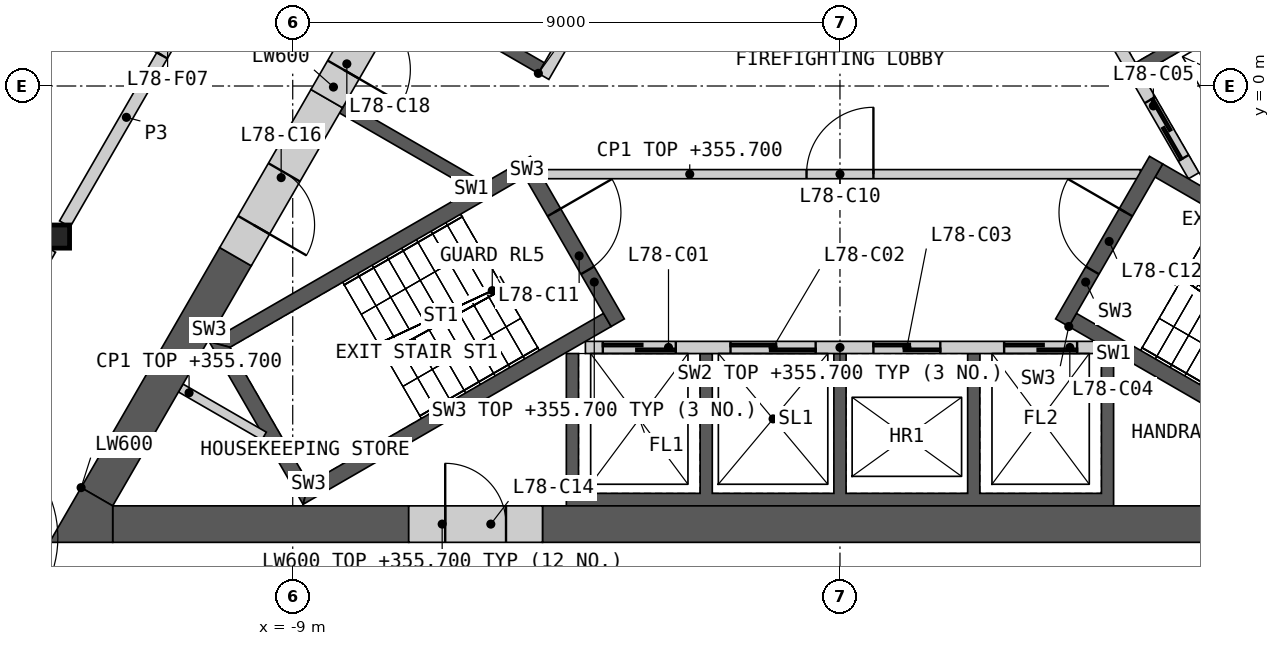
"""IFC4 building model, lengths in metres.
Left out: names, types, materials, properties, quantities, classifications, styles, units other than length and angle.
Written with IfcOpenShell. Run it as: python <this file> out.ifc"""

import sys

from ifc_helpers import new_model, si_unit, direction, frame, frame_2d, origin, origin_2d, place, context, subcontext, project, spatial, polyline, rectangle, i_section, outline, extrude, element, fill, save


model = new_model("IFC4")
c1 = context("Model", 3, precision=1e-05, world=origin(), true_north=direction((0.0, 1.0)))
c2 = subcontext(c1, "Body", "Model", "MODEL_VIEW")
j1 = project(units=[si_unit("LENGTHUNIT", "METRE"), si_unit("PLANEANGLEUNIT", "RADIAN")], contexts=[c1])
p1 = place(None, origin())
s1 = spatial("IfcSite", under=j1, at=p1, CompositionType="ELEMENT")
p2 = place(p1, origin())
s2 = spatial("IfcBuilding", under=s1, at=p2, CompositionType="ELEMENT")
p3 = place(p2, frame((0.0, 0.0, 346.0)))
s3 = spatial("IfcBuildingStorey", under=s2, at=p3, CompositionType="ELEMENT", Elevation=346.0)
p4 = place(p3, frame((-12.868, -2.476, 0.0), z_axis=(0.0, 0.0, 1.0), x_axis=(1.0, 0.0, 0.0)))
e1 = element("IfcColumn", 1, at=p4, inside=s3, PredefinedType="COLUMN", context=c2, shape_type="SweptSolid", body=[
    extrude(i_section(OverallWidth=0.396, OverallDepth=0.381, WebThickness=0.019, FlangeThickness=0.03, at=origin_2d()), origin(), (0.0, 0.0, 1.0), 10.0),
])
p5 = place(p3, origin())
e2 = element("IfcWall", 2, at=p5, inside=s3, PredefinedType="SHEAR", context=c2, shape_type="SweptSolid", body=[
    extrude(outline(polyline([(4.5, -4.4), (4.5, -6.906), (-4.5, -6.906), (-4.5, -4.4), (-4.3, -4.4), (-4.3, -6.7), (-2.3, -6.7), (-2.3, -4.4), (-2.1, -4.4), (-2.1, -6.7), (-0.1, -6.7), (-0.1, -4.4), (0.1, -4.4), (0.1, -6.7), (2.1, -6.7), (2.1, -4.4), (2.3, -4.4), (2.3, -6.7), (4.3, -6.7), (4.3, -4.4), (4.5, -4.4)])), origin(), (0.0, 0.0, 1.0), 9.7),
])
p6 = place(p3, frame((-4.187, -4.3, 0.0), z_axis=(0.0, 0.0, 1.0), x_axis=(1.0, 0.0, 0.0)))
e3 = element("IfcWall", 3, at=p6, inside=s3, PredefinedType="SOLIDWALL", context=c2, shape_type="SweptSolid", body=[
    extrude(rectangle(XDim=8.373, YDim=0.2, at=frame_2d((4.187, 0.0))), origin(), (0.0, 0.0, 1.0), 9.7),
])
p7 = place(p6, frame((0.287, 0.0, 0.0)))
e4 = element("IfcOpeningElement", 4, at=p7, cuts=e3, PredefinedType="OPENING", context=c2, shape_type="SweptSolid", body=[
    extrude(rectangle(XDim=1.2, YDim=2.1, at=frame_2d((0.6, 1.05))), frame((0.0, 0.11, 0.0), z_axis=(0.0, -1.0, 0.0), x_axis=(1.0, 0.0, 0.0)), (0.0, 0.0, 1.0), 0.22),
])
p8 = place(p6, frame((2.387, 0.0, 0.0)))
e5 = element("IfcOpeningElement", 5, at=p8, cuts=e3, PredefinedType="OPENING", context=c2, shape_type="SweptSolid", body=[
    extrude(rectangle(XDim=1.4, YDim=2.1, at=frame_2d((0.7, 1.05))), frame((0.0, 0.11, 0.0), z_axis=(0.0, -1.0, 0.0), x_axis=(1.0, 0.0, 0.0)), (0.0, 0.0, 1.0), 0.22),
])
p9 = place(p6, frame((4.737, 0.0, 0.0)))
e6 = element("IfcOpeningElement", 6, at=p9, cuts=e3, PredefinedType="OPENING", context=c2, shape_type="SweptSolid", body=[
    extrude(rectangle(XDim=1.1, YDim=2.1, at=frame_2d((0.55, 1.05))), frame((0.0, 0.11, 0.0), z_axis=(0.0, -1.0, 0.0), x_axis=(1.0, 0.0, 0.0)), (0.0, 0.0, 1.0), 0.22),
])
p10 = place(p6, frame((6.887, 0.0, 0.0)))
e7 = element("IfcOpeningElement", 7, at=p10, cuts=e3, PredefinedType="OPENING", context=c2, shape_type="SweptSolid", body=[
    extrude(rectangle(XDim=1.2, YDim=2.1, at=frame_2d((0.6, 1.05))), frame((0.0, 0.11, 0.0), z_axis=(0.0, -1.0, 0.0), x_axis=(1.0, 0.0, 0.0)), (0.0, 0.0, 1.0), 0.22),
])
p11 = place(p3, origin())
e8 = element("IfcWall", 8, at=p11, inside=s3, PredefinedType="SHEAR", context=c2, shape_type="SweptSolid", body=[
    extrude(outline(polyline([(1.561, 6.097), (3.731, 7.35), (8.231, -0.444), (6.061, -1.697), (5.96, -1.524), (7.952, -0.374), (6.952, 1.358), (4.96, 0.208), (4.861, 0.381), (6.852, 1.531), (5.852, 3.263), (3.861, 2.113), (3.76, 2.287), (5.752, 3.437), (4.752, 5.169), (2.76, 4.019), (2.66, 4.192), (4.652, 5.342), (3.652, 7.074), (1.66, 5.924), (1.561, 6.097)])), origin(), (0.0, 0.0, 1.0), 9.7),
])
p12 = place(p3, frame((5.817, -1.476, 0.0), z_axis=(0.0, 0.0, 1.0), x_axis=(-0.500002616675, 0.866023893041, 0.0)))
e9 = element("IfcWall", 9, at=p12, inside=s3, PredefinedType="SOLIDWALL", context=c2, shape_type="SweptSolid", body=[
    extrude(rectangle(XDim=8.373, YDim=0.2, at=frame_2d((4.187, 0.0))), origin(), (0.0, 0.0, 1.0), 9.7),
])
p13 = place(p12, frame((0.337, 0.0, 0.0)))
e10 = element("IfcOpeningElement", 10, at=p13, cuts=e9, PredefinedType="OPENING", context=c2, shape_type="SweptSolid", body=[
    extrude(rectangle(XDim=1.1, YDim=2.1, at=frame_2d((0.55, 1.05))), frame((0.0, 0.11, 0.0), z_axis=(0.0, -1.0, 0.0), x_axis=(1.0, 0.0, 0.0)), (0.0, 0.0, 1.0), 0.22),
])
p14 = place(p12, frame((2.537, 0.0, 0.0)))
e11 = element("IfcOpeningElement", 11, at=p14, cuts=e9, PredefinedType="OPENING", context=c2, shape_type="SweptSolid", body=[
    extrude(rectangle(XDim=1.1, YDim=2.1, at=frame_2d((0.55, 1.05))), frame((0.0, 0.11, 0.0), z_axis=(0.0, -1.0, 0.0), x_axis=(1.0, 0.0, 0.0)), (0.0, 0.0, 1.0), 0.22),
])
p15 = place(p12, frame((4.737, 0.0, 0.0)))
e12 = element("IfcOpeningElement", 12, at=p15, cuts=e9, PredefinedType="OPENING", context=c2, shape_type="SweptSolid", body=[
    extrude(rectangle(XDim=1.1, YDim=2.1, at=frame_2d((0.55, 1.05))), frame((0.0, 0.11, 0.0), z_axis=(0.0, -1.0, 0.0), x_axis=(1.0, 0.0, 0.0)), (0.0, 0.0, 1.0), 0.22),
])
p16 = place(p12, frame((7.037, 0.0, 0.0)))
e13 = element("IfcOpeningElement", 13, at=p16, cuts=e9, PredefinedType="OPENING", context=c2, shape_type="SweptSolid", body=[
    extrude(rectangle(XDim=0.9, YDim=2.1, at=frame_2d((0.45, 1.05))), frame((0.0, 0.11, 0.0), z_axis=(0.0, -1.0, 0.0), x_axis=(1.0, 0.0, 0.0)), (0.0, 0.0, 1.0), 0.22),
])
p17 = place(p3, origin())
e14 = element("IfcWall", 14, at=p17, inside=s3, PredefinedType="SHEAR", context=c2, shape_type="SweptSolid", body=[
    extrude(outline(polyline([(-6.061, -1.697), (-8.231, -0.444), (-8.131, -0.271), (-5.96, -1.524), (-6.061, -1.697)])), origin(), (0.0, 0.0, 1.0), 9.7),
])
p18 = place(p3, origin())
e15 = element("IfcWall", 15, at=p18, inside=s3, PredefinedType="SHEAR", context=c2, shape_type="SweptSolid", body=[
    extrude(outline(polyline([(-4.96, 0.208), (-7.131, 1.461), (-3.731, 7.35), (-1.561, 6.097), (-1.66, 5.924), (-3.652, 7.074), (-6.852, 1.531), (-4.861, 0.381), (-4.96, 0.208)])), origin(), (0.0, 0.0, 1.0), 9.7),
])
p19 = place(p3, frame((-1.631, 5.776, 0.0), z_axis=(0.0, 0.0, 1.0), x_axis=(-0.499992876559, -0.866029516466, 0.0)))
e16 = element("IfcWall", 16, at=p19, inside=s3, PredefinedType="SOLIDWALL", context=c2, shape_type="SweptSolid", body=[
    extrude(rectangle(XDim=6.486, YDim=0.2, at=frame_2d((3.243, 0.0))), origin(), (0.0, 0.0, 1.0), 9.7),
])
p20 = place(p19, frame((2.637, 0.0, 0.0)))
e17 = element("IfcOpeningElement", 17, at=p20, cuts=e16, PredefinedType="OPENING", context=c2, shape_type="SweptSolid", body=[
    extrude(rectangle(XDim=0.9, YDim=2.1, at=frame_2d((0.45, 1.05))), frame((0.0, 0.11, 0.0), z_axis=(0.0, -1.0, 0.0), x_axis=(1.0, 0.0, 0.0)), (0.0, 0.0, 1.0), 0.22),
])
p21 = place(p3, frame((-4.941, -1.45, 0.0), z_axis=(0.0, 0.0, 1.0), x_axis=(1.0, 0.0, 0.0)))
e18 = element("IfcWall", 18, at=p21, inside=s3, PredefinedType="PARTITIONING", context=c2, shape_type="SweptSolid", body=[
    extrude(rectangle(XDim=9.882, YDim=0.15, at=frame_2d((4.941, 0.0))), origin(), (0.0, 0.0, 1.0), 9.7),
])
p22 = place(p21, frame((4.391, 0.0, 0.0)))
e19 = element("IfcOpeningElement", 19, at=p22, cuts=e18, PredefinedType="OPENING", context=c2, shape_type="SweptSolid", body=[
    extrude(rectangle(XDim=1.1, YDim=2.1, at=frame_2d((0.55, 1.05))), frame((0.0, 0.085, 0.0), z_axis=(0.0, -1.0, 0.0), x_axis=(1.0, 0.0, 0.0)), (0.0, 0.0, 1.0), 0.17),
])
p23 = place(p3, origin())
e20 = element("IfcWall", 20, at=p23, inside=s3, PredefinedType="SHEAR", context=c2, shape_type="SweptSolid", body=[
    extrude(outline(polyline([(-5.307, -1.281), (-10.374, -4.206), (-10.032, -4.298), (-5.182, -1.498), (-5.307, -1.281)])), origin(), (0.0, 0.0, 1.0), 9.7),
])
p24 = place(p3, origin())
e21 = element("IfcWall", 21, at=p24, inside=s3, PredefinedType="SHEAR", context=c2, shape_type="SweptSolid", body=[
    extrude(outline(polyline([(-10.374, -4.206), (-8.83, -6.881), (-8.738, -6.539), (-10.032, -4.298), (-10.374, -4.206)])), origin(), (0.0, 0.0, 1.0), 9.7),
])
p25 = place(p3, origin())
e22 = element("IfcWall", 22, at=p25, inside=s3, PredefinedType="SHEAR", context=c2, shape_type="SweptSolid", body=[
    extrude(outline(polyline([(-8.738, -6.539), (-8.83, -6.881), (-3.763, -3.956), (-3.888, -3.739), (-8.738, -6.539)])), origin(), (0.0, 0.0, 1.0), 9.7),
])
p26 = place(p3, frame((-5.199, -1.219, 0.0), z_axis=(0.0, 0.0, 1.0), x_axis=(0.499982516597, -0.866035497597, 0.0)))
e23 = element("IfcWall", 23, at=p26, inside=s3, PredefinedType="SHEAR", context=c2, shape_type="SweptSolid", body=[
    extrude(rectangle(XDim=3.088, YDim=0.25, at=frame_2d((1.544, 0.0))), origin(), (0.0, 0.0, 1.0), 9.7),
])
p27 = place(p26, frame((0.994, 0.0, 0.0)))
e24 = element("IfcOpeningElement", 24, at=p27, cuts=e23, PredefinedType="OPENING", context=c2, shape_type="SweptSolid", body=[
    extrude(rectangle(XDim=1.1, YDim=2.1, at=frame_2d((0.55, 1.05))), frame((0.0, 0.135, 0.0), z_axis=(0.0, -1.0, 0.0), x_axis=(1.0, 0.0, 0.0)), (0.0, 0.0, 1.0), 0.27),
])
p28 = place(p3, origin())
e25 = element("IfcWall", 25, at=p28, inside=s3, PredefinedType="SHEAR", context=c2, shape_type="SweptSolid", body=[
    extrude(outline(polyline([(3.763, -3.956), (8.83, -6.881), (8.738, -6.539), (3.888, -3.739), (3.763, -3.956)])), origin(), (0.0, 0.0, 1.0), 9.7),
])
p29 = place(p3, origin())
e26 = element("IfcWall", 26, at=p29, inside=s3, PredefinedType="SHEAR", context=c2, shape_type="SweptSolid", body=[
    extrude(outline(polyline([(10.032, -4.298), (10.374, -4.206), (5.307, -1.281), (5.182, -1.498), (10.032, -4.298)])), origin(), (0.0, 0.0, 1.0), 9.7),
])
p30 = place(p3, frame((3.655, -3.893, 0.0), z_axis=(0.0, 0.0, 1.0), x_axis=(0.499982516597, 0.866035497597, 0.0)))
e27 = element("IfcWall", 27, at=p30, inside=s3, PredefinedType="SHEAR", context=c2, shape_type="SweptSolid", body=[
    extrude(rectangle(XDim=3.088, YDim=0.25, at=frame_2d((1.544, 0.0))), origin(), (0.0, 0.0, 1.0), 9.7),
])
p31 = place(p30, frame((0.994, 0.0, 0.0)))
e28 = element("IfcOpeningElement", 28, at=p31, cuts=e27, PredefinedType="OPENING", context=c2, shape_type="SweptSolid", body=[
    extrude(rectangle(XDim=1.1, YDim=2.1, at=frame_2d((0.55, 1.05))), frame((0.0, 0.135, 0.0), z_axis=(0.0, -1.0, 0.0), x_axis=(1.0, 0.0, 0.0)), (0.0, 0.0, 1.0), 0.27),
])
p32 = place(p3, frame((-10.842, -4.967, 0.0), z_axis=(0.0, 0.0, 1.0), x_axis=(0.866098216386, -0.499873863663, 0.0)))
e29 = element("IfcWall", 29, at=p32, inside=s3, PredefinedType="PARTITIONING", context=c2, shape_type="SweptSolid", body=[
    extrude(rectangle(XDim=1.582, YDim=0.15, at=frame_2d((0.791, 0.0))), origin(), (0.0, 0.0, 1.0), 9.7),
])
p33 = place(p3, frame((-4.892, -7.206, 0.0), z_axis=(0.0, 0.0, 1.0), x_axis=(1.0, 0.0, 0.0)))
e30 = element("IfcWall", 30, at=p33, inside=s3, PredefinedType="SHEAR", context=c2, shape_type="SweptSolid", body=[
    extrude(rectangle(XDim=16.853, YDim=0.6, at=frame_2d((8.426, 0.0))), origin(), (0.0, 0.0, 1.0), 9.7),
])
p34 = place(p3, frame((-11.961, -7.206, 0.0), z_axis=(0.0, 0.0, 1.0), x_axis=(1.0, 0.0, 0.0)))
e31 = element("IfcWall", 31, at=p34, inside=s3, PredefinedType="SHEAR", context=c2, shape_type="SweptSolid", body=[
    extrude(rectangle(XDim=4.868, YDim=0.6, at=frame_2d((2.434, 0.0))), origin(), (0.0, 0.0, 1.0), 9.7),
])
p35 = place(p3, frame((8.686, -0.634, 0.0), z_axis=(0.0, 0.0, 1.0), x_axis=(-0.500004601921, 0.866022746848, 0.0)))
e32 = element("IfcWall", 32, at=p35, inside=s3, PredefinedType="SHEAR", context=c2, shape_type="SweptSolid", body=[
    extrude(rectangle(XDim=16.853, YDim=0.6, at=frame_2d((8.426, 0.0))), origin(), (0.0, 0.0, 1.0), 9.7),
])
p36 = place(p3, frame((-9.941, -2.807, 0.0), z_axis=(0.0, 0.0, 1.0), x_axis=(-0.500020646047, -0.866013483456, 0.0)))
e33 = element("IfcWall", 33, at=p36, inside=s3, PredefinedType="SHEAR", context=c2, shape_type="SweptSolid", body=[
    extrude(rectangle(XDim=4.559, YDim=0.6, at=frame_2d((2.28, 0.0))), origin(), (0.0, 0.0, 1.0), 9.7),
])
p37 = place(p3, origin())
e34 = element("IfcWall", 34, at=p37, inside=s3, PredefinedType="SHEAR", context=c2, shape_type="SweptSolid", body=[
    extrude(outline(polyline([(-12.48, -6.606), (-11.961, -6.906), (-11.961, -7.506), (-13.0, -7.506), (-12.48, -6.606)])), origin(), (0.0, 0.0, 1.0), 9.7),
])
p38 = place(p3, frame((-7.092, -7.206, 0.0), z_axis=(0.0, 0.0, 1.0), x_axis=(1.0, 0.0, 0.0)))
e35 = element("IfcWall", 35, at=p38, inside=s3, PredefinedType="SHEAR", context=c2, shape_type="SweptSolid", body=[
    extrude(rectangle(XDim=2.2, YDim=0.6, at=frame_2d((1.1, 0.0))), origin(), (0.0, 0.0, 1.0), 9.7),
])
p39 = place(p38, frame((0.6, 0.0, 0.0)))
e36 = element("IfcOpeningElement", 36, at=p39, cuts=e35, PredefinedType="OPENING", context=c2, shape_type="SweptSolid", body=[
    extrude(rectangle(XDim=1.0, YDim=2.1, at=frame_2d((0.5, 1.05))), frame((0.0, 0.31, 0.0), z_axis=(0.0, -1.0, 0.0), x_axis=(1.0, 0.0, 0.0)), (0.0, 0.0, 1.0), 0.62),
])
p40 = place(p3, frame((-8.44, -0.208, 0.0), z_axis=(0.0, 0.0, 1.0), x_axis=(-0.499997052475, -0.866027105532, 0.0)))
e37 = element("IfcWall", 37, at=p40, inside=s3, PredefinedType="SHEAR", context=c2, shape_type="SweptSolid", body=[
    extrude(rectangle(XDim=3.001, YDim=0.6, at=frame_2d((1.501, 0.0))), origin(), (0.0, 0.0, 1.0), 9.7),
])
p41 = place(p40, frame((1.4, 0.0, 0.0)))
e38 = element("IfcOpeningElement", 38, at=p41, cuts=e37, PredefinedType="OPENING", context=c2, shape_type="SweptSolid", body=[
    extrude(rectangle(XDim=1.0, YDim=2.1, at=frame_2d((0.5, 1.05))), frame((0.0, 0.31, 0.0), z_axis=(0.0, -1.0, 0.0), x_axis=(1.0, 0.0, 0.0)), (0.0, 0.0, 1.0), 0.62),
])
p42 = place(p3, frame((-7.34, 1.698, 0.0), z_axis=(0.0, 0.0, 1.0), x_axis=(-0.50002983664, -0.866008176907, 0.0)))
e39 = element("IfcWall", 39, at=p42, inside=s3, PredefinedType="SHEAR", context=c2, shape_type="SweptSolid", body=[
    extrude(rectangle(XDim=2.2, YDim=0.6, at=frame_2d((1.1, 0.0))), origin(), (0.0, 0.0, 1.0), 9.7),
])
p43 = place(p42, frame((0.55, 0.0, 0.0)))
e40 = element("IfcOpeningElement", 40, at=p43, cuts=e39, PredefinedType="OPENING", context=c2, shape_type="SweptSolid", body=[
    extrude(rectangle(XDim=1.1, YDim=2.1, at=frame_2d((0.55, 1.05))), frame((0.0, 0.31, 0.0), z_axis=(0.0, -1.0, 0.0), x_axis=(1.0, 0.0, 0.0)), (0.0, 0.0, 1.0), 0.62),
])
p44 = place(p3, frame((-12.748, -2.269, 0.0), z_axis=(0.0, 0.0, 1.0), x_axis=(0.499984266882, 0.866034487114, 0.0)))
e41 = element("IfcWall", 41, at=p44, inside=s3, PredefinedType="PARTITIONING", context=c2, shape_type="SweptSolid", body=[
    extrude(rectangle(XDim=8.099, YDim=0.2, at=frame_2d((4.049, 0.0))), origin(), (0.0, 0.0, 1.0), 9.7),
])
p45 = place(p44, frame((3.2, 0.0, 0.0)))
e42 = element("IfcOpeningElement", 42, at=p45, cuts=e41, PredefinedType="OPENING", context=c2, shape_type="SweptSolid", body=[
    extrude(rectangle(XDim=1.8, YDim=2.1, at=frame_2d((0.9, 1.05))), frame((0.0, 0.11, 0.0), z_axis=(0.0, -1.0, 0.0), x_axis=(1.0, 0.0, 0.0)), (0.0, 0.0, 1.0), 0.22),
])
p46 = place(p3, frame((-15.244, -6.592, 0.0), z_axis=(0.0, 0.0, 1.0), x_axis=(0.49999094734, 0.866030630277, 0.0)))
e43 = element("IfcWall", 43, at=p46, inside=s3, PredefinedType="PARTITIONING", context=c2, shape_type="SweptSolid", body=[
    extrude(rectangle(XDim=4.513, YDim=0.2, at=frame_2d((2.256, 0.0))), origin(), (0.0, 0.0, 1.0), 9.7),
])
p47 = place(p46, frame((1.053, 0.0, 0.0)))
e44 = element("IfcOpeningElement", 44, at=p47, cuts=e43, PredefinedType="OPENING", context=c2, shape_type="SweptSolid", body=[
    extrude(rectangle(XDim=1.0, YDim=2.1, at=frame_2d((0.5, 1.05))), frame((0.0, 0.11, 0.0), z_axis=(0.0, -1.0, 0.0), x_axis=(1.0, 0.0, 0.0)), (0.0, 0.0, 1.0), 0.22),
])
p48 = place(p7, origin())
e45 = element("IfcDoor", 45, at=p48, inside=s3, OperationType="SLIDING_TO_LEFT", PredefinedType="DOOR", context=c2, shape_type="SweptSolid", body=[
    extrude(rectangle(XDim=1.2, YDim=2.1, at=frame_2d((0.6, 1.05))), frame((0.0, 0.025, 0.0), z_axis=(0.0, -1.0, 0.0), x_axis=(1.0, 0.0, 0.0)), (0.0, 0.0, 1.0), 0.05),
])
fill(e4, e45)
p49 = place(p8, origin())
e46 = element("IfcDoor", 46, at=p49, inside=s3, OperationType="SLIDING_TO_LEFT", PredefinedType="DOOR", context=c2, shape_type="SweptSolid", body=[
    extrude(rectangle(XDim=1.4, YDim=2.1, at=frame_2d((0.7, 1.05))), frame((0.0, 0.025, 0.0), z_axis=(0.0, -1.0, 0.0), x_axis=(1.0, 0.0, 0.0)), (0.0, 0.0, 1.0), 0.05),
])
fill(e5, e46)
p50 = place(p9, origin())
e47 = element("IfcDoor", 47, at=p50, inside=s3, OperationType="SLIDING_TO_LEFT", PredefinedType="DOOR", context=c2, shape_type="SweptSolid", body=[
    extrude(rectangle(XDim=1.1, YDim=2.1, at=frame_2d((0.55, 1.05))), frame((0.0, 0.025, 0.0), z_axis=(0.0, -1.0, 0.0), x_axis=(1.0, 0.0, 0.0)), (0.0, 0.0, 1.0), 0.05),
])
fill(e6, e47)
p51 = place(p10, origin())
e48 = element("IfcDoor", 48, at=p51, inside=s3, OperationType="SLIDING_TO_LEFT", PredefinedType="DOOR", context=c2, shape_type="SweptSolid", body=[
    extrude(rectangle(XDim=1.2, YDim=2.1, at=frame_2d((0.6, 1.05))), frame((0.0, 0.025, 0.0), z_axis=(0.0, -1.0, 0.0), x_axis=(1.0, 0.0, 0.0)), (0.0, 0.0, 1.0), 0.05),
])
fill(e7, e48)
p52 = place(p13, origin())
e49 = element("IfcDoor", 49, at=p52, inside=s3, OperationType="SLIDING_TO_LEFT", PredefinedType="DOOR", context=c2, shape_type="SweptSolid", body=[
    extrude(rectangle(XDim=1.1, YDim=2.1, at=frame_2d((0.55, 1.05))), frame((0.0, 0.025, 0.0), z_axis=(0.0, -1.0, 0.0), x_axis=(1.0, 0.0, 0.0)), (0.0, 0.0, 1.0), 0.05),
])
fill(e10, e49)
p53 = place(p22, origin())
e50 = element("IfcDoor", 50, at=p53, inside=s3, OperationType="SINGLE_SWING_RIGHT", PredefinedType="DOOR", context=c2, shape_type="SweptSolid", body=[
    extrude(rectangle(XDim=1.1, YDim=2.1, at=frame_2d((0.55, 1.05))), frame((0.0, 0.025, 0.0), z_axis=(0.0, -1.0, 0.0), x_axis=(1.0, 0.0, 0.0)), (0.0, 0.0, 1.0), 0.05),
])
fill(e19, e50)
p54 = place(p27, origin())
e51 = element("IfcDoor", 51, at=p54, inside=s3, OperationType="SINGLE_SWING_LEFT", PredefinedType="DOOR", context=c2, shape_type="SweptSolid", body=[
    extrude(rectangle(XDim=1.1, YDim=2.1, at=frame_2d((0.55, 1.05))), frame((0.0, 0.025, 0.0), z_axis=(0.0, -1.0, 0.0), x_axis=(1.0, 0.0, 0.0)), (0.0, 0.0, 1.0), 0.05),
])
fill(e24, e51)
p55 = place(p31, origin())
e52 = element("IfcDoor", 52, at=p55, inside=s3, OperationType="SINGLE_SWING_RIGHT", PredefinedType="DOOR", context=c2, shape_type="SweptSolid", body=[
    extrude(rectangle(XDim=1.1, YDim=2.1, at=frame_2d((0.55, 1.05))), frame((0.0, 0.025, 0.0), z_axis=(0.0, -1.0, 0.0), x_axis=(1.0, 0.0, 0.0)), (0.0, 0.0, 1.0), 0.05),
])
fill(e28, e52)
p56 = place(p39, origin())
e53 = element("IfcDoor", 53, at=p56, inside=s3, OperationType="SINGLE_SWING_LEFT", PredefinedType="DOOR", context=c2, shape_type="SweptSolid", body=[
    extrude(rectangle(XDim=1.0, YDim=2.1, at=frame_2d((0.5, 1.05))), frame((0.0, 0.055, 0.0), z_axis=(0.0, -1.0, 0.0), x_axis=(1.0, 0.0, 0.0)), (0.0, 0.0, 1.0), 0.05),
])
fill(e36, e53)
p57 = place(p41, origin())
e54 = element("IfcDoor", 54, at=p57, inside=s3, OperationType="SINGLE_SWING_RIGHT", PredefinedType="DOOR", context=c2, shape_type="SweptSolid", body=[
    extrude(rectangle(XDim=1.0, YDim=2.1, at=frame_2d((0.5, 1.05))), frame((0.0, 0.055, 0.0), z_axis=(0.0, -1.0, 0.0), x_axis=(1.0, 0.0, 0.0)), (0.0, 0.0, 1.0), 0.05),
])
fill(e38, e54)
p58 = place(p43, origin())
e55 = element("IfcDoor", 55, at=p58, inside=s3, OperationType="SINGLE_SWING_RIGHT", PredefinedType="DOOR", context=c2, shape_type="SweptSolid", body=[
    extrude(rectangle(XDim=1.1, YDim=2.1, at=frame_2d((0.55, 1.05))), frame((0.0, 0.055, 0.0), z_axis=(0.0, -1.0, 0.0), x_axis=(1.0, 0.0, 0.0)), (0.0, 0.0, 1.0), 0.05),
])
fill(e40, e55)
p59 = place(p45, origin())
e56 = element("IfcDoor", 56, at=p59, inside=s3, OperationType="DOUBLE_DOOR_SINGLE_SWING", PredefinedType="DOOR", context=c2, shape_type="SweptSolid", body=[
    extrude(rectangle(XDim=1.8, YDim=2.1, at=frame_2d((0.9, 1.05))), frame((0.0, 0.025, 0.0), z_axis=(0.0, -1.0, 0.0), x_axis=(1.0, 0.0, 0.0)), (0.0, 0.0, 1.0), 0.05),
])
fill(e42, e56)
save(model, sys.argv[1])
